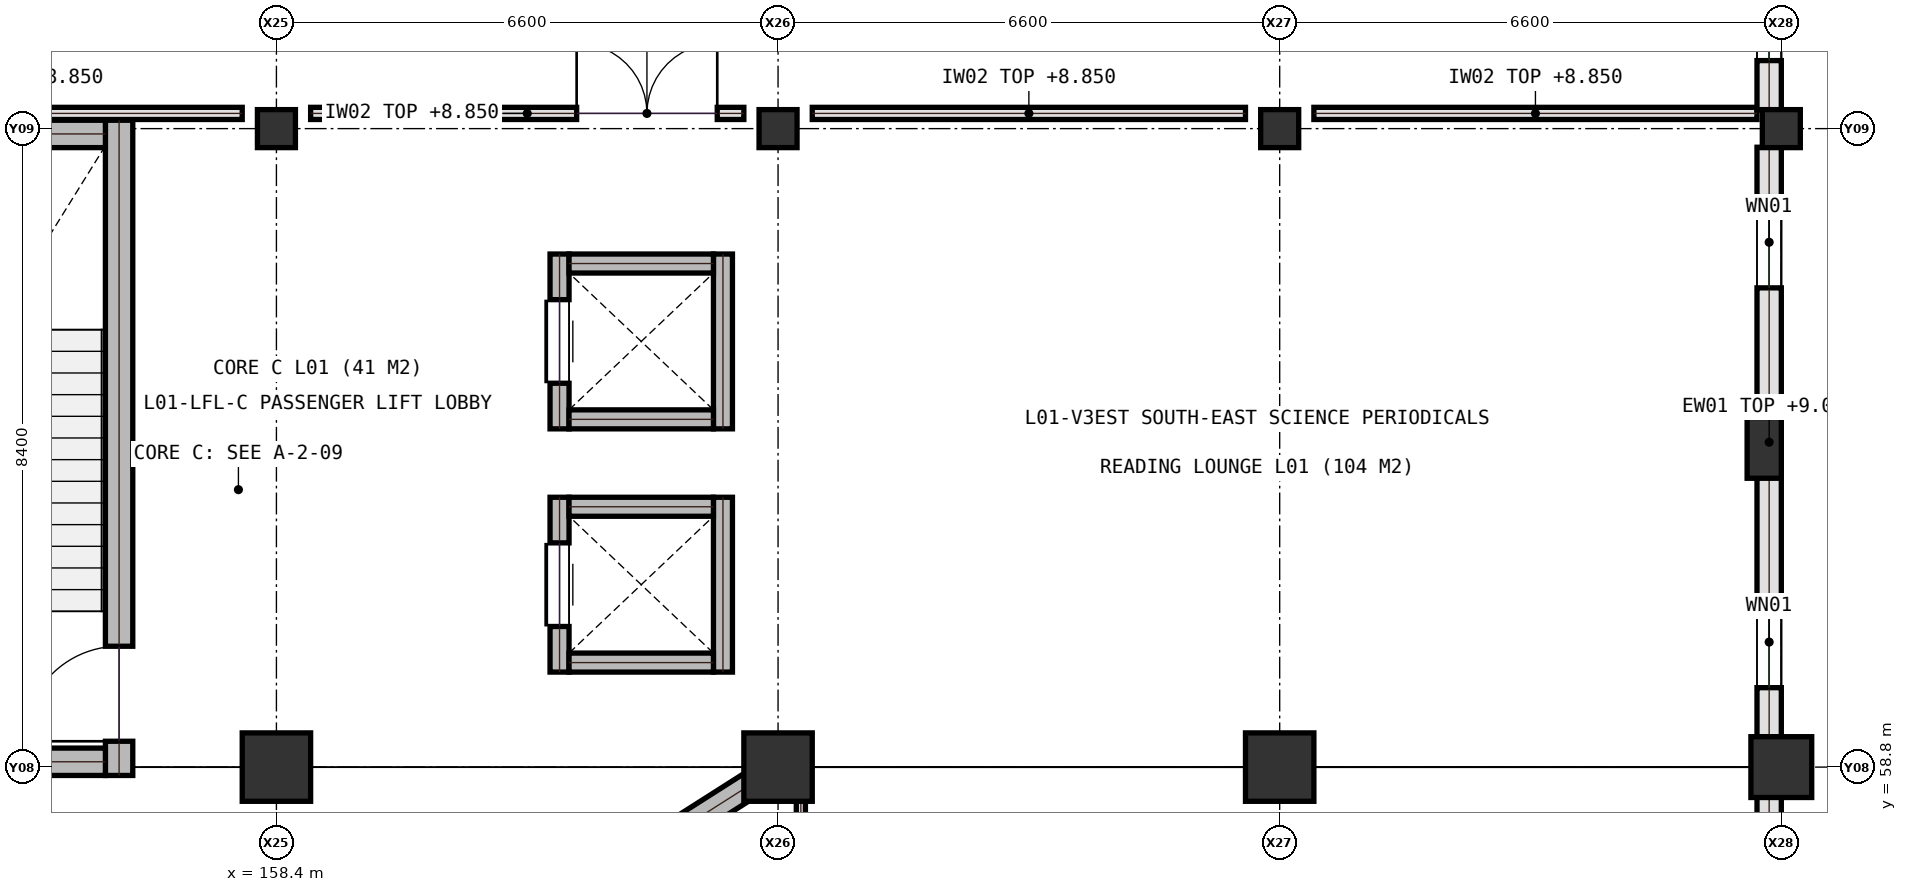
"""IFC4 building model, lengths in metres.
Left out: names, types, materials, properties, quantities, classifications, styles, units other than length and angle.
Written with IfcOpenShell. Run it as: python <this file> out.ifc"""

import sys

from ifc_helpers import new_model, si_unit, direction, frame, frame_2d, origin, origin_2d, place, context, subcontext, project, spatial, rectangle, extrude, element, fill, save


model = new_model("IFC4")
c1 = context("Model", 3, precision=1e-05, world=origin(), true_north=direction((0.0, 1.0)))
c2 = subcontext(c1, "Body", "Model", "MODEL_VIEW")
j1 = project(units=[si_unit("LENGTHUNIT", "METRE"), si_unit("PLANEANGLEUNIT", "RADIAN")], contexts=[c1])
p1 = place(None, origin())
s1 = spatial("IfcSite", under=j1, at=p1, CompositionType="ELEMENT")
p2 = place(p1, origin())
s2 = spatial("IfcBuilding", under=s1, at=p2, CompositionType="ELEMENT")
p3 = place(p2, frame((0.0, 0.0, 5.4)))
s3 = spatial("IfcBuildingStorey", under=s2, at=p3, CompositionType="ELEMENT", Elevation=5.4)
p4 = place(p3, frame((158.4, 58.8, 0.0), z_axis=(0.0, 0.0, 1.0), x_axis=(1.0, 0.0, 0.0)))
e1 = element("IfcColumn", 1, at=p4, inside=s3, PredefinedType="COLUMN", context=c2, shape_type="SweptSolid", body=[
    extrude(rectangle(XDim=0.9, YDim=0.9, at=origin_2d()), origin(), (0.0, 0.0, 1.0), 4.5),
])
p5 = place(p3, frame((158.4, 67.2, 0.0), z_axis=(0.0, 0.0, 1.0), x_axis=(1.0, 0.0, 0.0)))
e2 = element("IfcColumn", 2, at=p5, inside=s3, PredefinedType="COLUMN", context=c2, shape_type="SweptSolid", body=[
    extrude(rectangle(XDim=0.5, YDim=0.5, at=origin_2d()), origin(), (0.0, 0.0, 1.0), 4.5),
])
p6 = place(p3, frame((165.0, 58.8, 0.0), z_axis=(0.0, 0.0, 1.0), x_axis=(1.0, 0.0, 0.0)))
e3 = element("IfcColumn", 3, at=p6, inside=s3, PredefinedType="COLUMN", context=c2, shape_type="SweptSolid", body=[
    extrude(rectangle(XDim=0.9, YDim=0.9, at=origin_2d()), origin(), (0.0, 0.0, 1.0), 4.5),
])
p7 = place(p3, frame((165.0, 67.2, 0.0), z_axis=(0.0, 0.0, 1.0), x_axis=(1.0, 0.0, 0.0)))
e4 = element("IfcColumn", 4, at=p7, inside=s3, PredefinedType="COLUMN", context=c2, shape_type="SweptSolid", body=[
    extrude(rectangle(XDim=0.5, YDim=0.5, at=origin_2d()), origin(), (0.0, 0.0, 1.0), 4.5),
])
p8 = place(p3, frame((171.6, 58.8, 0.0), z_axis=(0.0, 0.0, 1.0), x_axis=(1.0, 0.0, 0.0)))
e5 = element("IfcColumn", 5, at=p8, inside=s3, PredefinedType="COLUMN", context=c2, shape_type="SweptSolid", body=[
    extrude(rectangle(XDim=0.9, YDim=0.9, at=origin_2d()), origin(), (0.0, 0.0, 1.0), 4.5),
])
p9 = place(p3, frame((171.6, 67.2, 0.0), z_axis=(0.0, 0.0, 1.0), x_axis=(1.0, 0.0, 0.0)))
e6 = element("IfcColumn", 6, at=p9, inside=s3, PredefinedType="COLUMN", context=c2, shape_type="SweptSolid", body=[
    extrude(rectangle(XDim=0.5, YDim=0.5, at=origin_2d()), origin(), (0.0, 0.0, 1.0), 4.5),
])
p10 = place(p3, frame((178.2, 58.8, 0.0), z_axis=(0.0, 0.0, 1.0), x_axis=(1.0, 0.0, 0.0)))
e7 = element("IfcColumn", 7, at=p10, inside=s3, PredefinedType="COLUMN", context=c2, shape_type="SweptSolid", body=[
    extrude(rectangle(XDim=0.8, YDim=0.8, at=origin_2d()), origin(), (0.0, 0.0, 1.0), 4.5),
])
p11 = place(p3, frame((178.2, 67.2, 0.0), z_axis=(0.0, 0.0, 1.0), x_axis=(1.0, 0.0, 0.0)))
e8 = element("IfcColumn", 8, at=p11, inside=s3, PredefinedType="COLUMN", context=c2, shape_type="SweptSolid", body=[
    extrude(rectangle(XDim=0.5, YDim=0.5, at=origin_2d()), origin(), (0.0, 0.0, 1.0), 4.5),
])
p12 = place(p3, frame((177.975, 63.0, 0.0), z_axis=(0.0, 0.0, 1.0), x_axis=(1.0, 0.0, 0.0)))
e9 = element("IfcColumn", 9, at=p12, inside=s3, PredefinedType="PILASTER", context=c2, shape_type="SweptSolid", body=[
    extrude(rectangle(XDim=0.45, YDim=0.8, at=origin_2d()), origin(), (0.0, 0.0, 1.0), 4.5),
])
p13 = place(p3, frame((152.0, 67.4, 0.0), z_axis=(0.0, 0.0, 1.0), x_axis=(1.0, 0.0, 0.0)))
e10 = element("IfcWall", 10, at=p13, inside=s3, PredefinedType="PARTITIONING", context=c2, shape_type="SweptSolid", body=[
    extrude(rectangle(XDim=5.95, YDim=0.16, at=frame_2d((2.975, 0.0))), origin(), (0.0, 0.0, 1.0), 3.45),
])
p14 = place(p3, frame((158.85, 67.4, 0.0), z_axis=(0.0, 0.0, 1.0), x_axis=(1.0, 0.0, 0.0)))
e11 = element("IfcWall", 11, at=p14, inside=s3, PredefinedType="PARTITIONING", context=c2, shape_type="SweptSolid", body=[
    extrude(rectangle(XDim=5.7, YDim=0.16, at=frame_2d((2.85, 0.0))), origin(), (0.0, 0.0, 1.0), 3.45),
])
p15 = place(p14, frame((3.5, 0.0, 0.0)))
e12 = element("IfcOpeningElement", 12, at=p15, cuts=e11, PredefinedType="OPENING", context=c2, shape_type="SweptSolid", body=[
    extrude(rectangle(XDim=1.85, YDim=2.25, at=frame_2d((0.925, 1.125))), frame((0.0, 0.09, 0.0), z_axis=(0.0, -1.0, 0.0), x_axis=(1.0, 0.0, 0.0)), (0.0, 0.0, 1.0), 0.18),
])
p16 = place(p3, frame((165.45, 67.4, 0.0), z_axis=(0.0, 0.0, 1.0), x_axis=(1.0, 0.0, 0.0)))
e13 = element("IfcWall", 13, at=p16, inside=s3, PredefinedType="PARTITIONING", context=c2, shape_type="SweptSolid", body=[
    extrude(rectangle(XDim=5.7, YDim=0.16, at=frame_2d((2.85, 0.0))), origin(), (0.0, 0.0, 1.0), 3.45),
])
p17 = place(p3, frame((172.05, 67.4, 0.0), z_axis=(0.0, 0.0, 1.0), x_axis=(1.0, 0.0, 0.0)))
e14 = element("IfcWall", 14, at=p17, inside=s3, PredefinedType="PARTITIONING", context=c2, shape_type="SweptSolid", body=[
    extrude(rectangle(XDim=5.83, YDim=0.16, at=frame_2d((2.915, 0.0))), origin(), (0.0, 0.0, 1.0), 3.45),
])
p18 = place(p3, frame((165.3, 50.85, 0.0), z_axis=(0.0, 0.0, 1.0), x_axis=(0.0, 1.0, 0.0)))
e15 = element("IfcWall", 15, at=p18, inside=s3, PredefinedType="PARTITIONING", context=c2, shape_type="SweptSolid", body=[
    extrude(rectangle(XDim=7.65, YDim=0.12, at=frame_2d((3.825, 0.0))), origin(), (0.0, 0.0, 1.0), 3.45),
])
p19 = place(p18, frame((4.4, 0.0, 0.0)))
e16 = element("IfcOpeningElement", 16, at=p19, cuts=e15, PredefinedType="OPENING", context=c2, shape_type="SweptSolid", body=[
    extrude(rectangle(XDim=0.95, YDim=2.15, at=frame_2d((0.475, 1.075))), frame((0.0, 0.07, 0.0), z_axis=(0.0, -1.0, 0.0), x_axis=(1.0, 0.0, 0.0)), (0.0, 0.0, 1.0), 0.14),
])
p20 = place(p3, frame((178.04, 50.795, 0.0), z_axis=(0.0, 0.0, 1.0), x_axis=(0.0, 1.0, 0.0)))
e17 = element("IfcWall", 17, at=p20, inside=s3, PredefinedType="SOLIDWALL", context=c2, shape_type="SweptSolid", body=[
    extrude(rectangle(XDim=7.61, YDim=0.32, at=frame_2d((3.805, 0.0))), origin(), (0.0, 0.0, 1.0), 3.485),
])
p21 = place(p20, frame((2.255, 0.0, 0.95)))
e18 = element("IfcOpeningElement", 18, at=p21, cuts=e17, PredefinedType="OPENING", context=c2, shape_type="SweptSolid", body=[
    extrude(rectangle(XDim=3.1, YDim=2.05, at=frame_2d((1.55, 1.025))), frame((0.0, 0.17, 0.0), z_axis=(0.0, -1.0, 0.0), x_axis=(1.0, 0.0, 0.0)), (0.0, 0.0, 1.0), 0.34),
])
p22 = place(p3, frame((178.04, 59.195, 0.0), z_axis=(0.0, 0.0, 1.0), x_axis=(0.0, 1.0, 0.0)))
e19 = element("IfcWall", 19, at=p22, inside=s3, PredefinedType="SOLIDWALL", context=c2, shape_type="SweptSolid", body=[
    extrude(rectangle(XDim=7.76, YDim=0.32, at=frame_2d((3.88, 0.0))), origin(), (0.0, 0.0, 1.0), 3.635),
])
p23 = place(p22, frame((0.65, 0.0, 0.95)))
e20 = element("IfcOpeningElement", 20, at=p23, cuts=e19, PredefinedType="OPENING", context=c2, shape_type="SweptSolid", body=[
    extrude(rectangle(XDim=1.2, YDim=1.5, at=frame_2d((0.6, 0.75))), frame((0.0, 0.17, 0.0), z_axis=(0.0, -1.0, 0.0), x_axis=(1.0, 0.0, 0.0)), (0.0, 0.0, 1.0), 0.34),
])
p24 = place(p22, frame((5.91, 0.0, 0.95)))
e21 = element("IfcOpeningElement", 21, at=p24, cuts=e19, PredefinedType="OPENING", context=c2, shape_type="SweptSolid", body=[
    extrude(rectangle(XDim=1.2, YDim=1.5, at=frame_2d((0.6, 0.75))), frame((0.0, 0.17, 0.0), z_axis=(0.0, -1.0, 0.0), x_axis=(1.0, 0.0, 0.0)), (0.0, 0.0, 1.0), 0.34),
])
p25 = place(p3, frame((178.04, 67.445, 0.0), z_axis=(0.0, 0.0, 1.0), x_axis=(0.0, 1.0, 0.0)))
e22 = element("IfcWall", 22, at=p25, inside=s3, PredefinedType="SOLIDWALL", context=c2, shape_type="SweptSolid", body=[
    extrude(rectangle(XDim=7.91, YDim=0.32, at=frame_2d((3.955, 0.0))), origin(), (0.0, 0.0, 1.0), 3.485),
])
p26 = place(p25, frame((0.65, 0.0, 0.95)))
e23 = element("IfcOpeningElement", 23, at=p26, cuts=e22, PredefinedType="OPENING", context=c2, shape_type="SweptSolid", body=[
    extrude(rectangle(XDim=1.2, YDim=1.5, at=frame_2d((0.6, 0.75))), frame((0.0, 0.17, 0.0), z_axis=(0.0, -1.0, 0.0), x_axis=(1.0, 0.0, 0.0)), (0.0, 0.0, 1.0), 0.34),
])
p27 = place(p25, frame((6.06, 0.0, 0.95)))
e24 = element("IfcOpeningElement", 24, at=p27, cuts=e22, PredefinedType="OPENING", context=c2, shape_type="SweptSolid", body=[
    extrude(rectangle(XDim=1.2, YDim=1.5, at=frame_2d((0.6, 0.75))), frame((0.0, 0.17, 0.0), z_axis=(0.0, -1.0, 0.0), x_axis=(1.0, 0.0, 0.0)), (0.0, 0.0, 1.0), 0.34),
])
p28 = place(p3, frame((158.65, 54.76, 0.0), z_axis=(0.0, 0.0, 1.0), x_axis=(0.843786613851, 0.536678814829, 0.0)))
e25 = element("IfcWall", 25, at=p28, inside=s3, PredefinedType="SHEAR", context=c2, shape_type="SweptSolid", body=[
    extrude(rectangle(XDim=7.229, YDim=0.34, at=frame_2d((3.615, 0.0))), origin(), (0.0, 0.0, 1.0), 4.2),
])
p29 = place(p3, frame((156.33, 58.69, 0.0), z_axis=(0.0, 0.0, 1.0), x_axis=(0.0, 1.0, 0.0)))
e26 = element("IfcWall", 26, at=p29, inside=s3, PredefinedType="SHEAR", context=c2, shape_type="SweptSolid", body=[
    extrude(rectangle(XDim=8.62, YDim=0.36, at=frame_2d((4.31, 0.0))), origin(), (0.0, 0.0, 1.0), 4.2),
])
p30 = place(p29, frame((0.45, 0.0, 0.0)))
e27 = element("IfcOpeningElement", 27, at=p30, cuts=e26, PredefinedType="OPENING", context=c2, shape_type="SweptSolid", body=[
    extrude(rectangle(XDim=1.25, YDim=2.15, at=frame_2d((0.625, 1.075))), frame((0.0, 0.19, 0.0), z_axis=(0.0, -1.0, 0.0), x_axis=(1.0, 0.0, 0.0)), (0.0, 0.0, 1.0), 0.38),
])
for number, where, z_axis, x_axis in (
    (28, (152.35, 67.13, 0.0), (0.0, 0.0, 1.0), (1.0, 0.0, 0.0)),
    (29, (152.35, 58.87, 0.0), (0.0, 0.0, 1.0), (1.0, 0.0, 0.0)),
):
    element("IfcWall", number, at=place(p3, frame(where, z_axis=z_axis, x_axis=x_axis)), inside=s3, PredefinedType="SHEAR", context=c2, shape_type="SweptSolid", body=[
        extrude(rectangle(XDim=3.8, YDim=0.36, at=frame_2d((1.9, 0.0))), origin(), (0.0, 0.0, 1.0), 4.2),
    ])
p31 = place(p3, frame((162.125, 60.05, 0.0), z_axis=(0.0, 0.0, 1.0), x_axis=(0.0, 1.0, 0.0)))
e30 = element("IfcWall", 30, at=p31, inside=s3, PredefinedType="SHEAR", context=c2, shape_type="SweptSolid", body=[
    extrude(rectangle(XDim=2.3, YDim=0.25, at=frame_2d((1.15, 0.0))), origin(), (0.0, 0.0, 1.0), 4.2),
])
p32 = place(p31, frame((0.6, 0.0, 0.0)))
e31 = element("IfcOpeningElement", 31, at=p32, cuts=e30, PredefinedType="OPENING", context=c2, shape_type="SweptSolid", body=[
    extrude(rectangle(XDim=1.1, YDim=2.15, at=frame_2d((0.55, 1.075))), frame((0.0, 0.135, 0.0), z_axis=(0.0, -1.0, 0.0), x_axis=(1.0, 0.0, 0.0)), (0.0, 0.0, 1.0), 0.27),
])
p33 = place(p3, frame((164.275, 60.05, 0.0), z_axis=(0.0, 0.0, 1.0), x_axis=(0.0, 1.0, 0.0)))
e32 = element("IfcWall", 32, at=p33, inside=s3, PredefinedType="SHEAR", context=c2, shape_type="SweptSolid", body=[
    extrude(rectangle(XDim=2.3, YDim=0.25, at=frame_2d((1.15, 0.0))), origin(), (0.0, 0.0, 1.0), 4.2),
])
for number, where, z_axis, x_axis in (
    (33, (162.25, 60.175, 0.0), (0.0, 0.0, 1.0), (1.0, 0.0, 0.0)),
    (34, (162.25, 62.225, 0.0), (0.0, 0.0, 1.0), (1.0, 0.0, 0.0)),
):
    element("IfcWall", number, at=place(p3, frame(where, z_axis=z_axis, x_axis=x_axis)), inside=s3, PredefinedType="SHEAR", context=c2, shape_type="SweptSolid", body=[
        extrude(rectangle(XDim=1.9, YDim=0.25, at=frame_2d((0.95, 0.0))), origin(), (0.0, 0.0, 1.0), 4.2),
    ])
p34 = place(p3, frame((162.125, 63.25, 0.0), z_axis=(0.0, 0.0, 1.0), x_axis=(0.0, 1.0, 0.0)))
e35 = element("IfcWall", 35, at=p34, inside=s3, PredefinedType="SHEAR", context=c2, shape_type="SweptSolid", body=[
    extrude(rectangle(XDim=2.3, YDim=0.25, at=frame_2d((1.15, 0.0))), origin(), (0.0, 0.0, 1.0), 4.2),
])
p35 = place(p34, frame((0.6, 0.0, 0.0)))
e36 = element("IfcOpeningElement", 36, at=p35, cuts=e35, PredefinedType="OPENING", context=c2, shape_type="SweptSolid", body=[
    extrude(rectangle(XDim=1.1, YDim=2.15, at=frame_2d((0.55, 1.075))), frame((0.0, 0.135, 0.0), z_axis=(0.0, -1.0, 0.0), x_axis=(1.0, 0.0, 0.0)), (0.0, 0.0, 1.0), 0.27),
])
p36 = place(p3, frame((164.275, 63.25, 0.0), z_axis=(0.0, 0.0, 1.0), x_axis=(0.0, 1.0, 0.0)))
e37 = element("IfcWall", 37, at=p36, inside=s3, PredefinedType="SHEAR", context=c2, shape_type="SweptSolid", body=[
    extrude(rectangle(XDim=2.3, YDim=0.25, at=frame_2d((1.15, 0.0))), origin(), (0.0, 0.0, 1.0), 4.2),
])
for number, where, z_axis, x_axis in (
    (38, (162.25, 63.375, 0.0), (0.0, 0.0, 1.0), (1.0, 0.0, 0.0)),
    (39, (162.25, 65.425, 0.0), (0.0, 0.0, 1.0), (1.0, 0.0, 0.0)),
):
    element("IfcWall", number, at=place(p3, frame(where, z_axis=z_axis, x_axis=x_axis)), inside=s3, PredefinedType="SHEAR", context=c2, shape_type="SweptSolid", body=[
        extrude(rectangle(XDim=1.9, YDim=0.25, at=frame_2d((0.95, 0.0))), origin(), (0.0, 0.0, 1.0), 4.2),
    ])
p37 = place(p15, origin())
e40 = element("IfcDoor", 40, at=p37, inside=s3, OperationType="DOUBLE_DOOR_SINGLE_SWING", PredefinedType="DOOR", context=c2, shape_type="SweptSolid", body=[
    extrude(rectangle(XDim=1.85, YDim=2.25, at=frame_2d((0.925, 1.125))), frame((0.0, 0.025, 0.0), z_axis=(0.0, -1.0, 0.0), x_axis=(1.0, 0.0, 0.0)), (0.0, 0.0, 1.0), 0.05),
])
fill(e12, e40)
p38 = place(p23, origin())
e41 = element("IfcWindow", 41, at=p38, inside=s3, PartitioningType="SINGLE_PANEL", PredefinedType="WINDOW", context=c2, shape_type="SweptSolid", body=[
    extrude(rectangle(XDim=1.2, YDim=1.5, at=frame_2d((0.6, 0.75))), frame((0.0, 0.03, 0.0), z_axis=(0.0, -1.0, 0.0), x_axis=(1.0, 0.0, 0.0)), (0.0, 0.0, 1.0), 0.06),
])
fill(e20, e41)
p39 = place(p24, origin())
e42 = element("IfcWindow", 42, at=p39, inside=s3, PartitioningType="SINGLE_PANEL", PredefinedType="WINDOW", context=c2, shape_type="SweptSolid", body=[
    extrude(rectangle(XDim=1.2, YDim=1.5, at=frame_2d((0.6, 0.75))), frame((0.0, 0.03, 0.0), z_axis=(0.0, -1.0, 0.0), x_axis=(1.0, 0.0, 0.0)), (0.0, 0.0, 1.0), 0.06),
])
fill(e21, e42)
p40 = place(p26, origin())
e43 = element("IfcWindow", 43, at=p40, inside=s3, PartitioningType="SINGLE_PANEL", PredefinedType="WINDOW", context=c2, shape_type="SweptSolid", body=[
    extrude(rectangle(XDim=1.2, YDim=1.5, at=frame_2d((0.6, 0.75))), frame((0.0, 0.03, 0.0), z_axis=(0.0, -1.0, 0.0), x_axis=(1.0, 0.0, 0.0)), (0.0, 0.0, 1.0), 0.06),
])
fill(e23, e43)
p41 = place(p30, origin())
e44 = element("IfcDoor", 44, at=p41, inside=s3, OperationType="SINGLE_SWING_LEFT", PredefinedType="DOOR", context=c2, shape_type="SweptSolid", body=[
    extrude(rectangle(XDim=1.25, YDim=2.15, at=frame_2d((0.625, 1.075))), frame((0.0, 0.025, 0.0), z_axis=(0.0, -1.0, 0.0), x_axis=(1.0, 0.0, 0.0)), (0.0, 0.0, 1.0), 0.05),
])
fill(e27, e44)
p42 = place(p32, origin())
e45 = element("IfcDoor", 45, at=p42, inside=s3, OperationType="SLIDING_TO_LEFT", PredefinedType="DOOR", context=c2, shape_type="SweptSolid", body=[
    extrude(rectangle(XDim=1.1, YDim=2.15, at=frame_2d((0.55, 1.075))), frame((0.0, 0.025, 0.0), z_axis=(0.0, -1.0, 0.0), x_axis=(1.0, 0.0, 0.0)), (0.0, 0.0, 1.0), 0.05),
])
fill(e31, e45)
p43 = place(p35, origin())
e46 = element("IfcDoor", 46, at=p43, inside=s3, OperationType="SLIDING_TO_LEFT", PredefinedType="DOOR", context=c2, shape_type="SweptSolid", body=[
    extrude(rectangle(XDim=1.1, YDim=2.15, at=frame_2d((0.55, 1.075))), frame((0.0, 0.025, 0.0), z_axis=(0.0, -1.0, 0.0), x_axis=(1.0, 0.0, 0.0)), (0.0, 0.0, 1.0), 0.05),
])
fill(e36, e46)
save(model, sys.argv[1])
